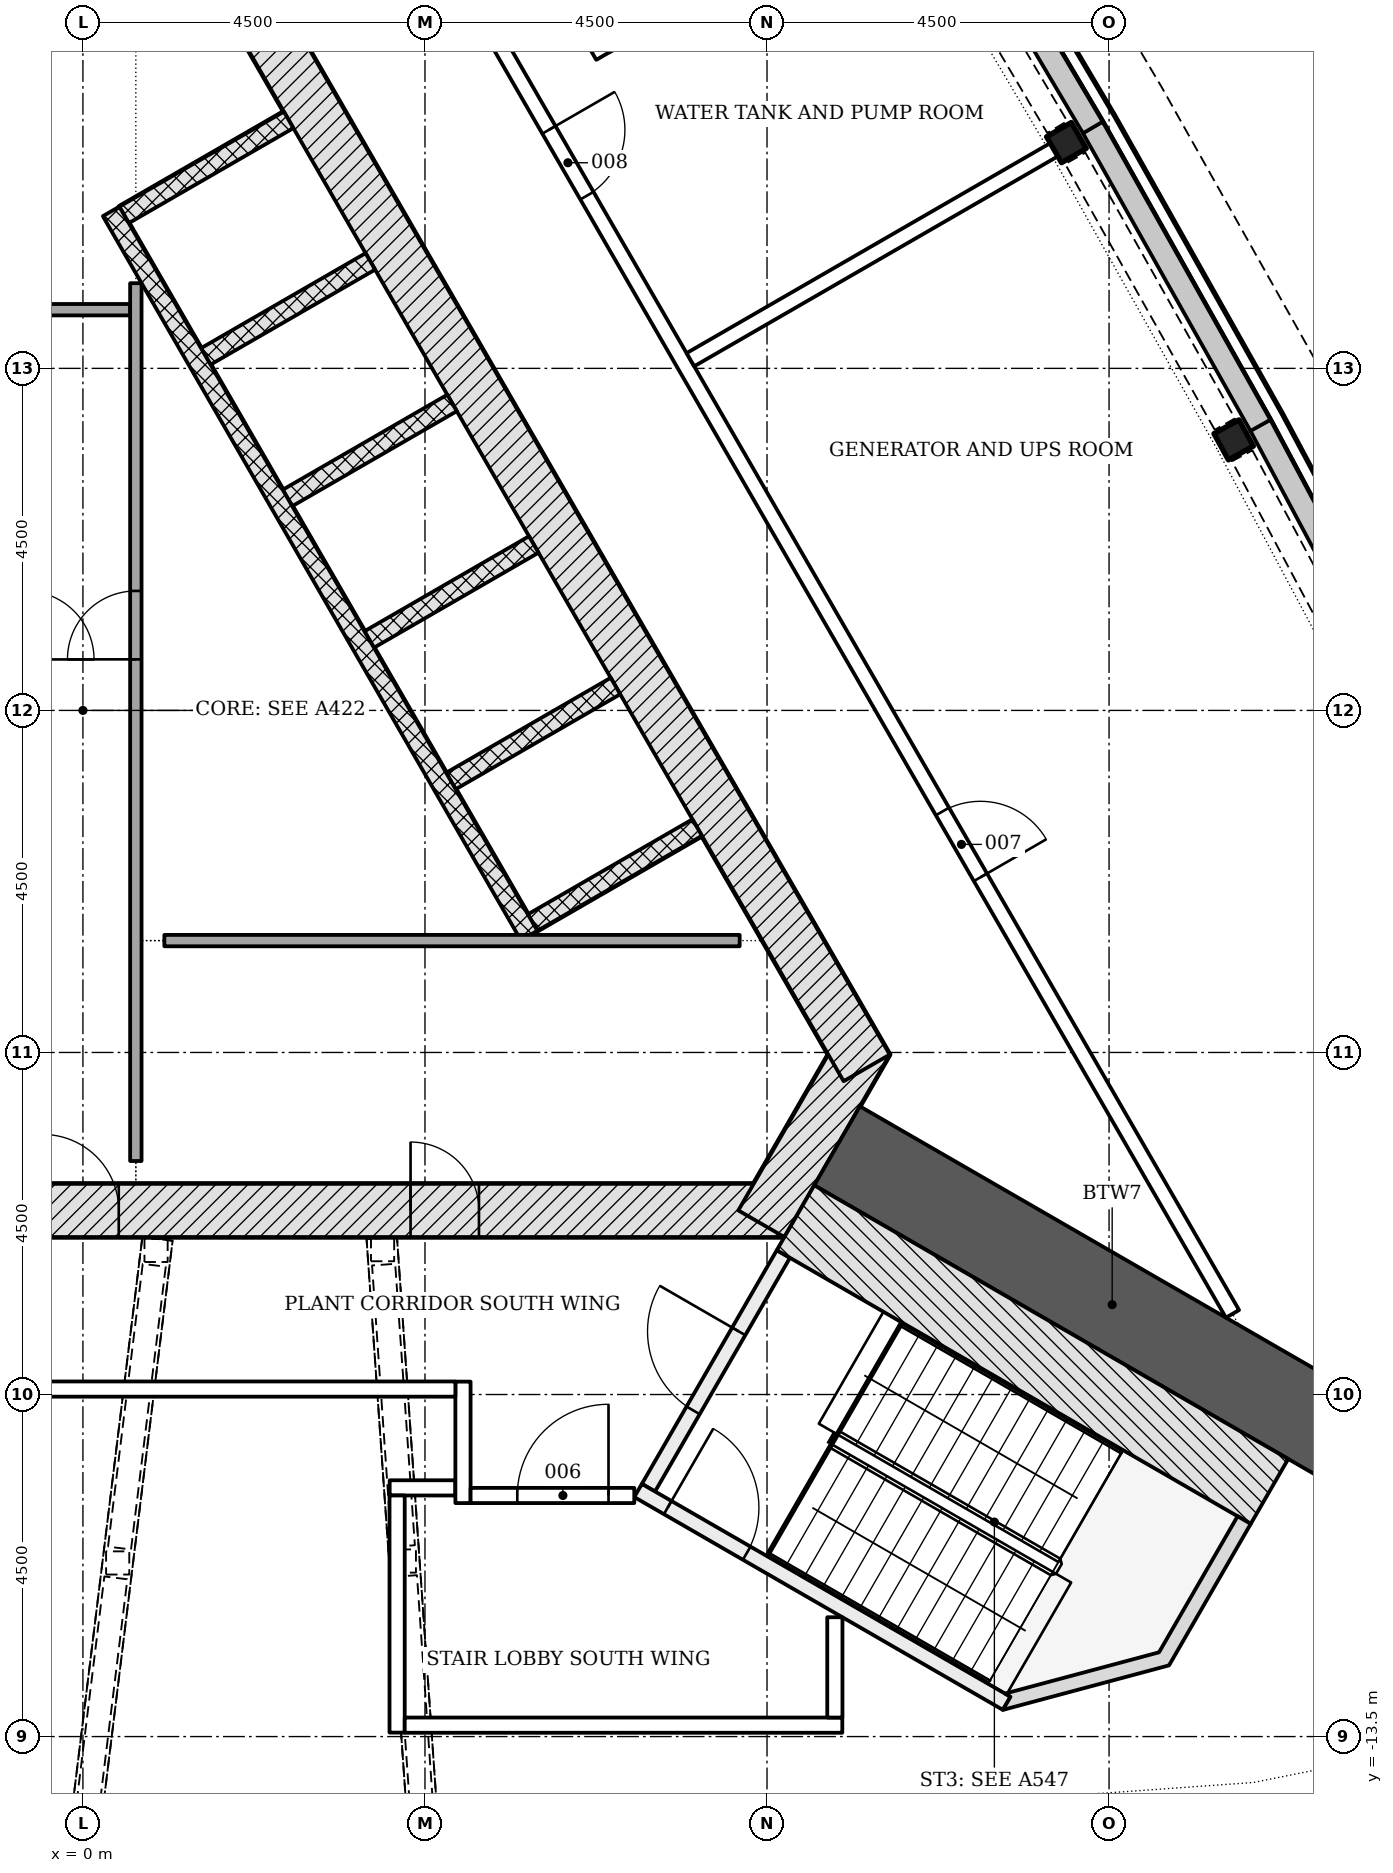
"""IFC4 building model, lengths in metres.
Left out: names, types, materials, properties, quantities, classifications, styles, units other than length and angle.
Written with IfcOpenShell. Run it as: python <this file> out.ifc"""

import sys

from ifc_helpers import new_model, si_unit, direction, frame, frame_2d, origin, origin_2d, place, context, subcontext, project, spatial, polyline, rectangle, i_section, outline, extrude, element, fill, save


model = new_model("IFC4")
c1 = context("Model", 3, precision=1e-05, world=origin(), true_north=direction((0.0, 1.0)))
c2 = subcontext(c1, "Body", "Model", "MODEL_VIEW")
j1 = project(units=[si_unit("LENGTHUNIT", "METRE"), si_unit("PLANEANGLEUNIT", "RADIAN")], contexts=[c1])
p1 = place(None, origin())
s1 = spatial("IfcSite", under=j1, at=p1, CompositionType="ELEMENT")
p2 = place(p1, origin())
s2 = spatial("IfcBuilding", under=s1, at=p2, CompositionType="ELEMENT")
p3 = place(p2, frame((0.0, 0.0, 210.3)))
s3 = spatial("IfcBuildingStorey", under=s2, at=p3, CompositionType="ELEMENT", Elevation=210.3)
p4 = place(p3, frame((-9.229, -6.578, -0.3), z_axis=(0.0, 0.0, 1.0), x_axis=(1.0, 0.0, 0.0)))
e1 = element("IfcWall", 1, at=p4, inside=s3, PredefinedType="SHEAR", context=c2, shape_type="SweptSolid", body=[
    extrude(rectangle(XDim=18.458, YDim=0.7, at=frame_2d((9.229, 0.0))), origin(), (0.0, 0.0, 1.0), 4.6),
])
p5 = place(p4, frame((8.7, 0.0, 0.3)))
e2 = element("IfcOpeningElement", 2, at=p5, cuts=e1, PredefinedType="OPENING", context=c2, shape_type="SweptSolid", body=[
    extrude(rectangle(XDim=1.0, YDim=2.1, at=frame_2d((0.5, 1.05))), frame((0.0, 0.36, 0.0), z_axis=(0.0, -1.0, 0.0), x_axis=(1.0, 0.0, 0.0)), (0.0, 0.0, 1.0), 0.72),
])
p6 = place(p4, frame((3.99, 0.0, 0.3)))
e3 = element("IfcOpeningElement", 3, at=p6, cuts=e1, PredefinedType="OPENING", context=c2, shape_type="SweptSolid", body=[
    extrude(rectangle(XDim=0.9, YDim=2.1, at=frame_2d((0.45, 1.05))), frame((0.0, 0.36, 0.0), z_axis=(0.0, -1.0, 0.0), x_axis=(1.0, 0.0, 0.0)), (0.0, 0.0, 1.0), 0.72),
])
p7 = place(p4, frame((13.539, 0.0, 0.3)))
e4 = element("IfcOpeningElement", 4, at=p7, cuts=e1, PredefinedType="OPENING", context=c2, shape_type="SweptSolid", body=[
    extrude(rectangle(XDim=0.9, YDim=2.1, at=frame_2d((0.45, 1.05))), frame((0.0, 0.36, 0.0), z_axis=(0.0, -1.0, 0.0), x_axis=(1.0, 0.0, 0.0)), (0.0, 0.0, 1.0), 0.72),
])
p8 = place(p3, frame((8.926, -6.753, -0.3), z_axis=(0.0, 0.0, 1.0), x_axis=(0.500042739161, 0.866000726912, 0.0)))
e5 = element("IfcWall", 5, at=p8, inside=s3, PredefinedType="SHEAR", context=c2, shape_type="SweptSolid", body=[
    extrude(rectangle(XDim=2.771, YDim=0.7, at=frame_2d((1.386, 0.0))), origin(), (0.0, 0.0, 1.0), 4.6),
])
p9 = place(p3, frame((10.311, -4.703, -0.3), z_axis=(0.0, 0.0, 1.0), x_axis=(-0.500001446645, 0.866024568562, 0.0)))
e6 = element("IfcWall", 6, at=p9, inside=s3, PredefinedType="SHEAR", context=c2, shape_type="SweptSolid", body=[
    extrude(rectangle(XDim=18.458, YDim=0.7, at=frame_2d((9.229, 0.0))), origin(), (0.0, 0.0, 1.0), 4.6),
])
p10 = place(p3, frame((9.922, -5.728, -0.3), z_axis=(0.0, 0.0, 1.0), x_axis=(0.866030911543, -0.499990460161, 0.0)))
e7 = element("IfcWall", 7, at=p10, inside=s3, PredefinedType="SHEAR", context=c2, shape_type="SweptSolid", body=[
    extrude(rectangle(XDim=8.359, YDim=1.2, at=frame_2d((4.179, 0.0))), origin(), (0.0, 0.0, 1.0), 4.6),
])
for number, where, z_axis, x_axis in (
    (8, (15.14, 3.559, -0.3), (0.0, 0.0, 1.0), (-0.481, 0.877, 0.0)),
    (9, (12.939, 7.47, -0.3), (0.0, 0.0, 1.0), (-0.5, 0.866, 0.0)),
):
    element("IfcColumn", number, at=place(p3, frame(where, z_axis=z_axis, x_axis=x_axis)), inside=s3, PredefinedType="COLUMN", context=c2, shape_type="SweptSolid", body=[
        extrude(i_section(OverallWidth=0.394, OverallDepth=0.376, WebThickness=0.017, FlangeThickness=0.028, FilletRadius=0.015, at=origin_2d()), origin(), (0.0, 0.0, 1.0), 4.6),
    ])
p11 = place(p3, origin())
e10 = element("IfcWall", 10, at=p11, inside=s3, PredefinedType="NOTDEFINED", context=c2, shape_type="SweptSolid", body=[
    extrude(outline(polyline([(17.741, -0.146), (15.622, 3.823), (15.357, 3.682), (17.477, -0.287), (17.741, -0.146)])), origin(), (0.0, 0.0, 1.0), 1.2),
])
p12 = place(p3, origin())
e11 = element("IfcWall", 11, at=p12, inside=s3, PredefinedType="NOTDEFINED", context=c2, shape_type="SweptSolid", body=[
    extrude(outline(polyline([(15.622, 3.823), (13.415, 7.745), (13.154, 7.598), (15.36, 3.677), (15.622, 3.823)])), origin(), (0.0, 0.0, 1.0), 1.2),
])
p13 = place(p3, origin())
e12 = element("IfcWall", 12, at=p13, inside=s3, PredefinedType="NOTDEFINED", context=c2, shape_type="SweptSolid", body=[
    extrude(outline(polyline([(13.415, 7.745), (11.122, 11.617), (10.864, 11.464), (13.157, 7.592), (13.415, 7.745)])), origin(), (0.0, 0.0, 1.0), 1.2),
])
p14 = place(p3, origin())
e13 = element("IfcWall", 13, at=p14, inside=s3, PredefinedType="NOTDEFINED", context=c2, shape_type="SweptSolid", body=[
    extrude(outline(polyline([(13.49, -15.042), (15.507, -14.898), (16.988, -14.602), (18.354, -13.958), (19.526, -13.004), (20.434, -11.797), (21.025, -10.408), (21.265, -8.917), (21.139, -7.411), (20.656, -5.98), (19.772, -4.162), (19.502, -4.293), (20.378, -6.094), (20.844, -7.473), (20.963, -8.905), (20.735, -10.324), (20.172, -11.646), (19.308, -12.795), (18.193, -13.702), (16.893, -14.315), (15.467, -14.6), (13.469, -14.743), (13.49, -15.042)])), origin(), (0.0, 0.0, 1.0), 4.3),
])
for number, where, z_axis, x_axis in (
    (14, (8.081, -1.541, -0.3), (0.0, 0.0, 1.0), (-0.866, -0.5, 0.0)),
    (15, (7.006, 0.321, -0.3), (0.0, 0.0, 1.0), (-0.866, -0.5, 0.0)),
):
    element("IfcWall", number, at=place(p3, frame(where, z_axis=z_axis, x_axis=x_axis)), inside=s3, PredefinedType="PARTITIONING", context=c2, shape_type="SweptSolid", body=[
        extrude(rectangle(XDim=2.5, YDim=0.25, at=frame_2d((1.25, 0.0))), origin(), (0.0, 0.0, 1.0), 4.6),
    ])
p15 = place(p3, frame((5.931, 2.183, -0.3), z_axis=(0.0, 0.0, 1.0), x_axis=(-0.866047370643, -0.499961950354, 0.0)))
e16 = element("IfcWall", 16, at=p15, inside=s3, PredefinedType="PARTITIONING", context=c2, shape_type="SweptSolid", body=[
    extrude(rectangle(XDim=2.5, YDim=0.25, at=frame_2d((1.25, 0.0))), origin(), (0.0, 0.0, 1.0), 4.6),
])
for number, where, z_axis, x_axis in (
    (17, (4.856, 4.045, -0.3), (0.0, 0.0, 1.0), (-0.866, -0.5, 0.0)),
    (18, (3.781, 5.907, -0.3), (0.0, 0.0, 1.0), (-0.866, -0.5, 0.0)),
    (19, (2.706, 7.769, -0.3), (0.0, 0.0, 1.0), (-0.866, -0.5, 0.0)),
):
    element("IfcWall", number, at=place(p3, frame(where, z_axis=z_axis, x_axis=x_axis)), inside=s3, PredefinedType="PARTITIONING", context=c2, shape_type="SweptSolid", body=[
        extrude(rectangle(XDim=2.5, YDim=0.25, at=frame_2d((1.25, 0.0))), origin(), (0.0, 0.0, 1.0), 4.6),
    ])
p16 = place(p3, frame((5.87, -2.961, 0.0), z_axis=(0.0, 0.0, 1.0), x_axis=(-0.50000615651, 0.866021849293, 0.0)))
e20 = element("IfcWall", 20, at=p16, inside=s3, PredefinedType="PARTITIONING", context=c2, shape_type="SweptSolid", body=[
    extrude(rectangle(XDim=11.0, YDim=0.25, at=frame_2d((5.5, 0.0))), origin(), (0.0, 0.0, 1.0), 4.3),
])
p17 = place(p3, frame((-0.679, 5.272, 0.0), z_axis=(0.0, 0.0, 1.0), x_axis=(1.0, 0.0, 0.0)))
e21 = element("IfcWall", 21, at=p17, inside=s3, PredefinedType="PARTITIONING", context=c2, shape_type="SweptSolid", body=[
    extrude(rectangle(XDim=1.3, YDim=0.15, at=frame_2d((0.65, 0.0))), origin(), (0.0, 0.0, 1.0), 4.3),
])
p18 = place(p3, frame((0.696, -5.928, 0.0), z_axis=(0.0, 0.0, 1.0), x_axis=(0.0, 1.0, 0.0)))
e22 = element("IfcWall", 22, at=p18, inside=s3, PredefinedType="PARTITIONING", context=c2, shape_type="SweptSolid", body=[
    extrude(rectangle(XDim=11.549, YDim=0.15, at=frame_2d((5.774, 0.0))), origin(), (0.0, 0.0, 1.0), 4.3),
])
p19 = place(p18, frame((6.6, 0.0, 0.0)))
e23 = element("IfcOpeningElement", 23, at=p19, cuts=e22, PredefinedType="OPENING", context=c2, shape_type="SweptSolid", body=[
    extrude(rectangle(XDim=0.9, YDim=2.1, at=frame_2d((0.45, 1.05))), frame((0.0, 0.085, 0.0), z_axis=(0.0, -1.0, 0.0), x_axis=(1.0, 0.0, 0.0)), (0.0, 0.0, 1.0), 0.17),
])
p20 = place(p3, frame((1.071, -3.028, 0.0), z_axis=(0.0, 0.0, 1.0), x_axis=(1.0, 0.0, 0.0)))
e24 = element("IfcWall", 24, at=p20, inside=s3, PredefinedType="PARTITIONING", context=c2, shape_type="SweptSolid", body=[
    extrude(rectangle(XDim=7.569, YDim=0.15, at=frame_2d((3.784, 0.0))), origin(), (0.0, 0.0, 1.0), 4.3),
])
p21 = place(p3, frame((7.44, -10.226, -0.3), z_axis=(0.0, 0.0, 1.0), x_axis=(0.500022077904, 0.866012656725, 0.0)))
e25 = element("IfcWall", 25, at=p21, inside=s3, PredefinedType="SHEAR", context=c2, shape_type="SweptSolid", body=[
    extrude(rectangle(XDim=3.55, YDim=0.2, at=frame_2d((1.775, 0.0))), origin(), (0.0, 0.0, 1.0), 4.6),
])
p22 = place(p21, frame((1.175, 0.0, 0.3)))
e26 = element("IfcOpeningElement", 26, at=p22, cuts=e25, PredefinedType="OPENING", context=c2, shape_type="SweptSolid", body=[
    extrude(rectangle(XDim=1.2, YDim=2.1, at=frame_2d((0.6, 1.05))), frame((0.0, 0.11, 0.0), z_axis=(0.0, -1.0, 0.0), x_axis=(1.0, 0.0, 0.0)), (0.0, 0.0, 1.0), 0.22),
])
p23 = place(p3, frame((7.304, -10.262, -0.3), z_axis=(0.0, 0.0, 1.0), x_axis=(0.866026594901, -0.49999793692, 0.0)))
e27 = element("IfcWall", 27, at=p23, inside=s3, PredefinedType="SHEAR", context=c2, shape_type="SweptSolid", body=[
    extrude(rectangle(XDim=5.6, YDim=0.2, at=frame_2d((2.8, 0.0))), origin(), (0.0, 0.0, 1.0), 4.6),
])
p24 = place(p23, frame((0.45, 0.0, 0.3)))
e28 = element("IfcOpeningElement", 28, at=p24, cuts=e27, PredefinedType="OPENING", context=c2, shape_type="SweptSolid", body=[
    extrude(rectangle(XDim=1.2, YDim=2.1, at=frame_2d((0.6, 1.05))), frame((0.0, 0.11, 0.0), z_axis=(0.0, -1.0, 0.0), x_axis=(1.0, 0.0, 0.0)), (0.0, 0.0, 1.0), 0.22),
])
p25 = place(p3, frame((9.375, -6.675, -0.3), z_axis=(0.0, 0.0, 1.0), x_axis=(0.866026919366, -0.499997374926, 0.0)))
e29 = element("IfcWall", 29, at=p25, inside=s3, PredefinedType="SHEAR", context=c2, shape_type="SweptSolid", body=[
    extrude(rectangle(XDim=7.2, YDim=0.986, at=frame_2d((3.6, 0.0))), origin(), (0.0, 0.0, 1.0), 4.6),
])
p26 = place(p3, frame((0.0, 0.0, -0.3)))
e30 = element("IfcWall", 30, at=p26, inside=s3, PredefinedType="SHEAR", context=c2, shape_type="SweptSolid", body=[
    extrude(outline(polyline([(12.104, -13.149), (14.289, -12.563), (15.364, -10.701), (15.191, -10.601), (14.157, -12.392), (12.132, -12.934), (12.204, -12.976), (12.204, -12.976), (12.204, -12.976), (12.204, -12.976), (12.204, -12.976), (12.204, -12.976), (12.204, -12.976), (12.204, -12.976), (12.204, -12.976), (12.204, -12.976), (12.204, -12.976), (12.204, -12.976), (12.204, -12.976), (12.204, -12.976), (12.204, -12.976), (12.204, -12.976), (12.204, -12.976), (12.104, -13.149)])), origin(), (0.0, 0.0, 1.0), 4.6),
])
p27 = place(p3, frame((4.036, -10.228, 0.0), z_axis=(0.0, 0.0, 1.0), x_axis=(1.0, 0.0, 0.0)))
e31 = element("IfcWall", 31, at=p27, inside=s3, PredefinedType="PARTITIONING", context=c2, shape_type="SweptSolid", body=[
    extrude(rectangle(XDim=0.864, YDim=0.2, at=frame_2d((0.432, 0.0))), origin(), (0.0, 0.0, 1.0), 4.3),
])
p28 = place(p3, frame((5.0, -10.428, 0.0), z_axis=(0.0, 0.0, 1.0), x_axis=(0.0, 1.0, 0.0)))
e32 = element("IfcWall", 32, at=p28, inside=s3, PredefinedType="PARTITIONING", context=c2, shape_type="SweptSolid", body=[
    extrude(rectangle(XDim=1.598, YDim=0.2, at=frame_2d((0.799, 0.0))), origin(), (0.0, 0.0, 1.0), 4.3),
])
p29 = place(p3, frame((5.1, -10.328, 0.0), z_axis=(0.0, 0.0, 1.0), x_axis=(1.0, 0.0, 0.0)))
e33 = element("IfcWall", 33, at=p29, inside=s3, PredefinedType="PARTITIONING", context=c2, shape_type="SweptSolid", body=[
    extrude(rectangle(XDim=2.154, YDim=0.2, at=frame_2d((1.077, 0.0))), origin(), (0.0, 0.0, 1.0), 4.3),
])
p30 = place(p29, frame((0.615, 0.0, 0.0)))
e34 = element("IfcOpeningElement", 34, at=p30, cuts=e33, PredefinedType="OPENING", context=c2, shape_type="SweptSolid", body=[
    extrude(rectangle(XDim=1.2, YDim=2.1, at=frame_2d((0.6, 1.05))), frame((0.0, 0.11, 0.0), z_axis=(0.0, -1.0, 0.0), x_axis=(1.0, 0.0, 0.0)), (0.0, 0.0, 1.0), 0.22),
])
p31 = place(p3, frame((-14.091, -8.928, 0.0), z_axis=(0.0, 0.0, 1.0), x_axis=(1.0, 0.0, 0.0)))
e35 = element("IfcWall", 35, at=p31, inside=s3, PredefinedType="PARTITIONING", context=c2, shape_type="SweptSolid", body=[
    extrude(rectangle(XDim=18.991, YDim=0.2, at=frame_2d((9.495, 0.0))), origin(), (0.0, 0.0, 1.0), 4.3),
])
p32 = place(p31, frame((10.411, 0.0, 0.0)))
e36 = element("IfcOpeningElement", 36, at=p32, cuts=e35, PredefinedType="OPENING", context=c2, shape_type="SweptSolid", body=[
    extrude(rectangle(XDim=1.0, YDim=2.1, at=frame_2d((0.5, 1.05))), frame((0.0, 0.11, 0.0), z_axis=(0.0, -1.0, 0.0), x_axis=(1.0, 0.0, 0.0)), (0.0, 0.0, 1.0), 0.22),
])
p33 = place(p3, frame((4.134, -10.328, 0.0), z_axis=(0.0, 0.0, 1.0), x_axis=(0.0, -1.0, 0.0)))
e37 = element("IfcWall", 37, at=p33, inside=s3, PredefinedType="PARTITIONING", context=c2, shape_type="SweptSolid", body=[
    extrude(rectangle(XDim=3.12, YDim=0.2, at=frame_2d((1.56, 0.0))), origin(), (0.0, 0.0, 1.0), 4.3),
])
p34 = place(p3, frame((4.234, -13.35, 0.0), z_axis=(0.0, 0.0, 1.0), x_axis=(1.0, 0.0, 0.0)))
e38 = element("IfcWall", 38, at=p34, inside=s3, PredefinedType="PARTITIONING", context=c2, shape_type="SweptSolid", body=[
    extrude(rectangle(XDim=5.757, YDim=0.2, at=frame_2d((2.878, 0.0))), origin(), (0.0, 0.0, 1.0), 3.874),
])
p35 = place(p3, frame((9.893, -13.25, 0.0), z_axis=(0.0, 0.0, 1.0), x_axis=(0.0, 1.0, 0.0)))
e39 = element("IfcWall", 39, at=p35, inside=s3, PredefinedType="PARTITIONING", context=c2, shape_type="SweptSolid", body=[
    extrude(rectangle(XDim=1.32, YDim=0.2, at=frame_2d((0.66, 0.0))), origin(), (0.0, 0.0, 1.0), 4.3),
])
p36 = place(p3, frame((6.408, 9.358, 0.0), z_axis=(0.0, 0.0, 1.0), x_axis=(0.49996696679, -0.866044474677, 0.0)))
e40 = element("IfcWall", 40, at=p36, inside=s3, PredefinedType="PARTITIONING", context=c2, shape_type="SweptSolid", body=[
    extrude(rectangle(XDim=0.864, YDim=0.2, at=frame_2d((0.432, 0.0))), origin(), (0.0, 0.0, 1.0), 3.752),
])
p37 = place(p3, frame((5.455, 8.808, 0.0), z_axis=(0.0, 0.0, 1.0), x_axis=(0.49999276215, -0.866029582519, 0.0)))
e41 = element("IfcWall", 41, at=p37, inside=s3, PredefinedType="PARTITIONING", context=c2, shape_type="SweptSolid", body=[
    extrude(rectangle(XDim=19.337, YDim=0.2, at=frame_2d((9.668, 0.0))), origin(), (0.0, 0.0, 1.0), 3.752),
])
p38 = place(p37, frame((11.705, 0.0, 0.0)))
e42 = element("IfcOpeningElement", 42, at=p38, cuts=e41, PredefinedType="OPENING", context=c2, shape_type="SweptSolid", body=[
    extrude(rectangle(XDim=1.0, YDim=2.1, at=frame_2d((0.5, 1.05))), frame((0.0, 0.11, 0.0), z_axis=(0.0, -1.0, 0.0), x_axis=(1.0, 0.0, 0.0)), (0.0, 0.0, 1.0), 0.22),
])
p39 = place(p37, frame((1.351, 0.0, 0.0)))
e43 = element("IfcOpeningElement", 43, at=p39, cuts=e41, PredefinedType="OPENING", context=c2, shape_type="SweptSolid", body=[
    extrude(rectangle(XDim=1.0, YDim=2.1, at=frame_2d((0.5, 1.05))), frame((0.0, 0.11, 0.0), z_axis=(0.0, -1.0, 0.0), x_axis=(1.0, 0.0, 0.0)), (0.0, 0.0, 1.0), 0.22),
])
p40 = place(p3, frame((7.992, 4.614, 0.0), z_axis=(0.0, 0.0, 1.0), x_axis=(0.866008693241, 0.500028942393, 0.0)))
e44 = element("IfcWall", 44, at=p40, inside=s3, PredefinedType="PARTITIONING", context=c2, shape_type="SweptSolid", body=[
    extrude(rectangle(XDim=5.562, YDim=0.2, at=frame_2d((2.781, 0.0))), origin(), (0.0, 0.0, 1.0), 3.752),
])
p41 = place(p3, frame((6.878, 8.744, 0.0), z_axis=(0.0, 0.0, 1.0), x_axis=(0.866023983177, 0.500002460556, 0.0)))
e45 = element("IfcWall", 45, at=p41, inside=s3, PredefinedType="PARTITIONING", context=c2, shape_type="SweptSolid", body=[
    extrude(rectangle(XDim=3.12, YDim=0.2, at=frame_2d((1.56, 0.0))), origin(), (0.0, 0.0, 1.0), 4.3),
])
p42 = place(p5, origin())
e46 = element("IfcDoor", 46, at=p42, inside=s3, OperationType="SINGLE_SWING_LEFT", PredefinedType="DOOR", context=c2, shape_type="SweptSolid", body=[
    extrude(rectangle(XDim=1.0, YDim=2.1, at=frame_2d((0.5, 1.05))), frame((0.0, 0.075, 0.0), z_axis=(0.0, -1.0, 0.0), x_axis=(1.0, 0.0, 0.0)), (0.0, 0.0, 1.0), 0.15),
])
fill(e2, e46)
p43 = place(p7, origin())
e47 = element("IfcDoor", 47, at=p43, inside=s3, OperationType="SINGLE_SWING_LEFT", PredefinedType="DOOR", context=c2, shape_type="SweptSolid", body=[
    extrude(rectangle(XDim=0.9, YDim=2.1, at=frame_2d((0.45, 1.05))), frame((0.0, 0.075, 0.0), z_axis=(0.0, -1.0, 0.0), x_axis=(1.0, 0.0, 0.0)), (0.0, 0.0, 1.0), 0.15),
])
fill(e4, e47)
p44 = place(p19, origin())
e48 = element("IfcDoor", 48, at=p44, inside=s3, OperationType="SINGLE_SWING_LEFT", PredefinedType="DOOR", context=c2, shape_type="SweptSolid", body=[
    extrude(rectangle(XDim=0.9, YDim=2.1, at=frame_2d((0.45, 1.05))), frame((0.0, 0.025, 0.0), z_axis=(0.0, -1.0, 0.0), x_axis=(1.0, 0.0, 0.0)), (0.0, 0.0, 1.0), 0.05),
])
fill(e23, e48)
p45 = place(p22, origin())
e49 = element("IfcDoor", 49, at=p45, inside=s3, OperationType="SINGLE_SWING_RIGHT", PredefinedType="DOOR", context=c2, shape_type="SweptSolid", body=[
    extrude(rectangle(XDim=1.2, YDim=2.1, at=frame_2d((0.6, 1.05))), frame((0.0, 0.025, 0.0), z_axis=(0.0, -1.0, 0.0), x_axis=(1.0, 0.0, 0.0)), (0.0, 0.0, 1.0), 0.05),
])
fill(e26, e49)
p46 = place(p24, origin())
e50 = element("IfcDoor", 50, at=p46, inside=s3, OperationType="SINGLE_SWING_LEFT", PredefinedType="DOOR", context=c2, shape_type="SweptSolid", body=[
    extrude(rectangle(XDim=1.2, YDim=2.1, at=frame_2d((0.6, 1.05))), frame((0.0, 0.025, 0.0), z_axis=(0.0, -1.0, 0.0), x_axis=(1.0, 0.0, 0.0)), (0.0, 0.0, 1.0), 0.05),
])
fill(e28, e50)
p47 = place(p30, origin())
e51 = element("IfcDoor", 51, at=p47, inside=s3, OperationType="SINGLE_SWING_RIGHT", PredefinedType="DOOR", context=c2, shape_type="SweptSolid", body=[
    extrude(rectangle(XDim=1.2, YDim=2.1, at=frame_2d((0.6, 1.05))), frame((0.0, 0.025, 0.0), z_axis=(0.0, -1.0, 0.0), x_axis=(1.0, 0.0, 0.0)), (0.0, 0.0, 1.0), 0.05),
])
fill(e34, e51)
p48 = place(p38, origin())
e52 = element("IfcDoor", 52, at=p48, inside=s3, OperationType="SINGLE_SWING_RIGHT", PredefinedType="DOOR", context=c2, shape_type="SweptSolid", body=[
    extrude(rectangle(XDim=1.0, YDim=2.1, at=frame_2d((0.5, 1.05))), frame((0.0, 0.025, 0.0), z_axis=(0.0, -1.0, 0.0), x_axis=(1.0, 0.0, 0.0)), (0.0, 0.0, 1.0), 0.05),
])
fill(e42, e52)
p49 = place(p39, origin())
e53 = element("IfcDoor", 53, at=p49, inside=s3, OperationType="SINGLE_SWING_LEFT", PredefinedType="DOOR", context=c2, shape_type="SweptSolid", body=[
    extrude(rectangle(XDim=1.0, YDim=2.1, at=frame_2d((0.5, 1.05))), frame((0.0, 0.025, 0.0), z_axis=(0.0, -1.0, 0.0), x_axis=(1.0, 0.0, 0.0)), (0.0, 0.0, 1.0), 0.05),
])
fill(e43, e53)
save(model, sys.argv[1])
